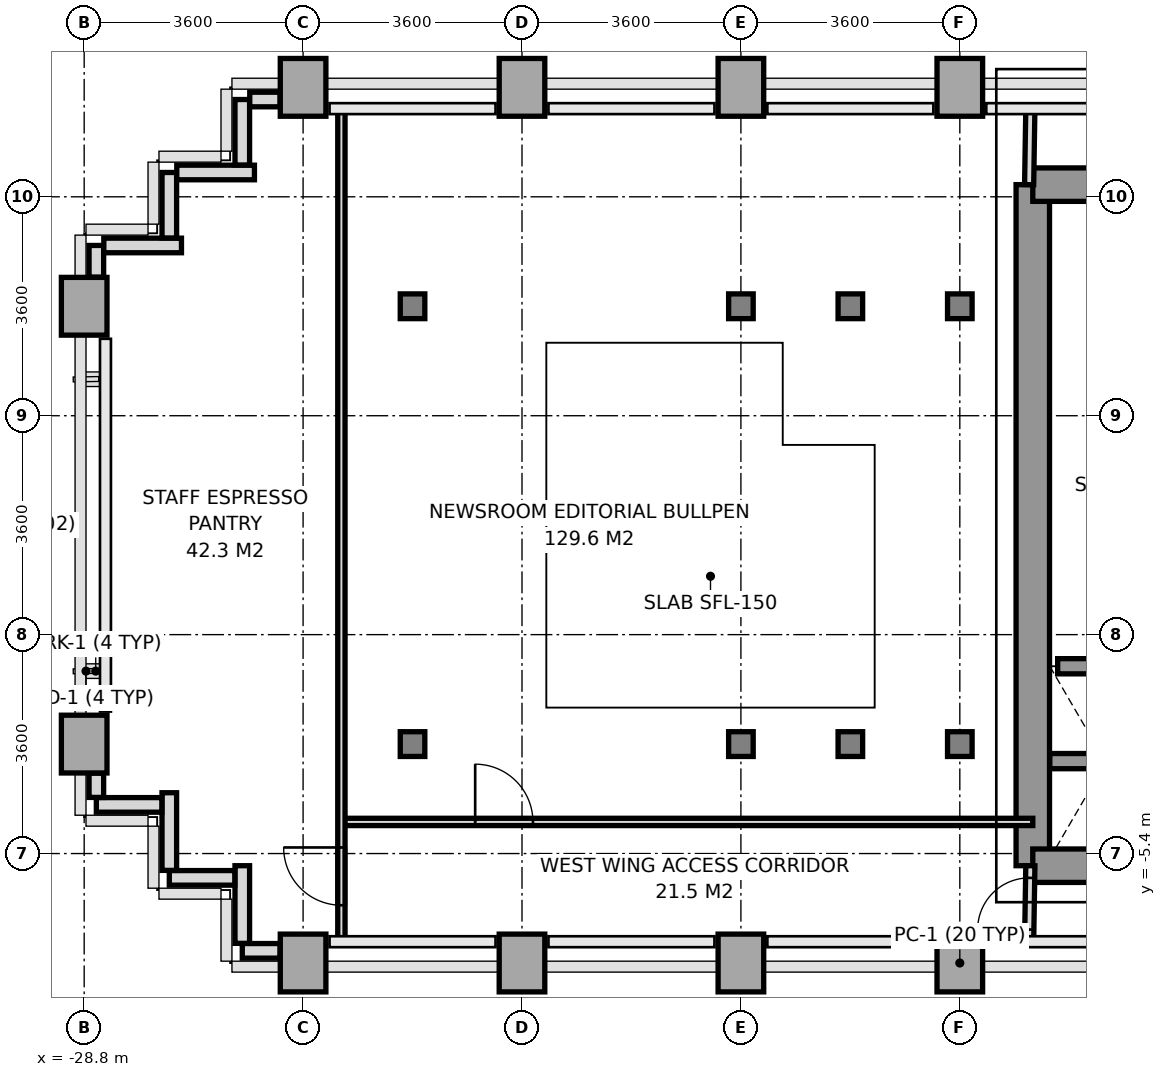
"""IFC4 building model, lengths in metres.
Left out: names, types, materials, properties, quantities, classifications, styles, units other than length and angle.
Written with IfcOpenShell. Run it as: python <this file> out.ifc"""

import sys

from ifc_helpers import new_model, si_unit, direction, frame, frame_2d, origin, origin_2d, place, context, subcontext, project, spatial, rectangle, i_section, extrude, source, transform, mapped, element, fill, save


model = new_model("IFC4")
c1 = context("Model", 3, precision=1e-05, world=origin(), true_north=direction((0.0, 1.0)))
c2 = subcontext(c1, "Body", "Model", "MODEL_VIEW")
j1 = project(units=[si_unit("LENGTHUNIT", "METRE"), si_unit("PLANEANGLEUNIT", "RADIAN")], contexts=[c1])
p1 = place(None, origin())
s1 = spatial("IfcSite", under=j1, at=p1, CompositionType="ELEMENT")
p2 = place(p1, origin())
s2 = spatial("IfcBuilding", under=s1, at=p2, CompositionType="ELEMENT")
p3 = place(p2, frame((0.0, 0.0, 30.6)))
s3 = spatial("IfcBuildingStorey", under=s2, at=p3, CompositionType="ELEMENT", Elevation=30.6)
m1 = source(origin(), c2, "Body", "SweptSolid", [
    extrude(rectangle(XDim=0.75, YDim=0.95, at=origin_2d()), origin(), (0.0, 0.0, 1.0), 3.2),
])
for number, where, z_axis, x_axis in (
    (1, (-28.8, -3.6, 0.0), (0.0, 0.0, 1.0), (1.0, 0.0, 0.0)),
    (2, (-28.8, 3.6, 0.0), (0.0, 0.0, 1.0), (1.0, 0.0, 0.0)),
    (3, (-25.2, -7.2, 0.0), (0.0, 0.0, 1.0), (1.0, 0.0, 0.0)),
    (4, (-25.2, 7.2, 0.0), (0.0, 0.0, 1.0), (1.0, 0.0, 0.0)),
):
    element("IfcColumn", number, at=place(p3, frame(where, z_axis=z_axis, x_axis=x_axis)), inside=s3, PredefinedType="COLUMN", context=c2, shape_type="MappedRepresentation", body=[
        mapped(m1, transform((0.0, 0.0, 0.0), x_axis=(1.0, 0.0, 0.0), y_axis=(0.0, 1.0, 0.0), z_axis=(0.0, 0.0, 1.0), scale=1.0)),
    ])
m2 = source(origin(), c2, "Body", "SweptSolid", [
    extrude(i_section(OverallWidth=0.404, OverallDepth=0.407, WebThickness=0.022, FlangeThickness=0.035, at=origin_2d()), origin(), (0.0, 0.0, 1.0), 3.2),
])
for number, where, z_axis, x_axis in (
    (5, (-23.4, -3.6, 0.0), (0.0, 0.0, 1.0), (1.0, 0.0, 0.0)),
    (6, (-23.4, 3.6, 0.0), (0.0, 0.0, 1.0), (1.0, 0.0, 0.0)),
):
    element("IfcColumn", number, at=place(p3, frame(where, z_axis=z_axis, x_axis=x_axis)), inside=s3, PredefinedType="COLUMN", context=c2, shape_type="MappedRepresentation", body=[
        mapped(m2, transform((0.0, 0.0, 0.0), x_axis=(1.0, 0.0, 0.0), y_axis=(0.0, 1.0, 0.0), z_axis=(0.0, 0.0, 1.0), scale=1.0)),
    ])
for number, where, z_axis, x_axis in (
    (7, (-21.6, -7.2, 0.0), (0.0, 0.0, 1.0), (1.0, 0.0, 0.0)),
    (8, (-21.6, 7.2, 0.0), (0.0, 0.0, 1.0), (1.0, 0.0, 0.0)),
    (9, (-18.0, -7.2, 0.0), (0.0, 0.0, 1.0), (1.0, 0.0, 0.0)),
):
    element("IfcColumn", number, at=place(p3, frame(where, z_axis=z_axis, x_axis=x_axis)), inside=s3, PredefinedType="COLUMN", context=c2, shape_type="MappedRepresentation", body=[
        mapped(m1, transform((0.0, 0.0, 0.0), x_axis=(1.0, 0.0, 0.0), y_axis=(0.0, 1.0, 0.0), z_axis=(0.0, 0.0, 1.0), scale=1.0)),
    ])
for number, where, z_axis, x_axis in (
    (10, (-18.0, -3.6, 0.0), (0.0, 0.0, 1.0), (1.0, 0.0, 0.0)),
    (11, (-18.0, 3.6, 0.0), (0.0, 0.0, 1.0), (1.0, 0.0, 0.0)),
):
    element("IfcColumn", number, at=place(p3, frame(where, z_axis=z_axis, x_axis=x_axis)), inside=s3, PredefinedType="COLUMN", context=c2, shape_type="MappedRepresentation", body=[
        mapped(m2, transform((0.0, 0.0, 0.0), x_axis=(1.0, 0.0, 0.0), y_axis=(0.0, 1.0, 0.0), z_axis=(0.0, 0.0, 1.0), scale=1.0)),
    ])
p4 = place(p3, frame((-18.0, 7.2, 0.0), z_axis=(0.0, 0.0, 1.0), x_axis=(1.0, 0.0, 0.0)))
e12 = element("IfcColumn", 12, at=p4, inside=s3, PredefinedType="COLUMN", context=c2, shape_type="MappedRepresentation", body=[
    mapped(m1, transform((0.0, 0.0, 0.0), x_axis=(1.0, 0.0, 0.0), y_axis=(0.0, 1.0, 0.0), z_axis=(0.0, 0.0, 1.0), scale=1.0)),
])
for number, where, z_axis, x_axis in (
    (13, (-16.2, -3.6, 0.0), (0.0, 0.0, 1.0), (1.0, 0.0, 0.0)),
    (14, (-16.2, 3.6, 0.0), (0.0, 0.0, 1.0), (1.0, 0.0, 0.0)),
):
    element("IfcColumn", number, at=place(p3, frame(where, z_axis=z_axis, x_axis=x_axis)), inside=s3, PredefinedType="COLUMN", context=c2, shape_type="MappedRepresentation", body=[
        mapped(m2, transform((0.0, 0.0, 0.0), x_axis=(1.0, 0.0, 0.0), y_axis=(0.0, 1.0, 0.0), z_axis=(0.0, 0.0, 1.0), scale=1.0)),
    ])
p5 = place(p3, frame((-14.4, -7.2, 0.0), z_axis=(0.0, 0.0, 1.0), x_axis=(1.0, 0.0, 0.0)))
e15 = element("IfcColumn", 15, at=p5, inside=s3, PredefinedType="COLUMN", context=c2, shape_type="MappedRepresentation", body=[
    mapped(m1, transform((0.0, 0.0, 0.0), x_axis=(1.0, 0.0, 0.0), y_axis=(0.0, 1.0, 0.0), z_axis=(0.0, 0.0, 1.0), scale=1.0)),
])
for number, where, z_axis, x_axis in (
    (16, (-14.4, -3.6, 0.0), (0.0, 0.0, 1.0), (1.0, 0.0, 0.0)),
    (17, (-14.4, 3.6, 0.0), (0.0, 0.0, 1.0), (1.0, 0.0, 0.0)),
):
    element("IfcColumn", number, at=place(p3, frame(where, z_axis=z_axis, x_axis=x_axis)), inside=s3, PredefinedType="COLUMN", context=c2, shape_type="MappedRepresentation", body=[
        mapped(m2, transform((0.0, 0.0, 0.0), x_axis=(1.0, 0.0, 0.0), y_axis=(0.0, 1.0, 0.0), z_axis=(0.0, 0.0, 1.0), scale=1.0)),
    ])
p6 = place(p3, frame((-14.4, 7.2, 0.0), z_axis=(0.0, 0.0, 1.0), x_axis=(1.0, 0.0, 0.0)))
e18 = element("IfcColumn", 18, at=p6, inside=s3, PredefinedType="COLUMN", context=c2, shape_type="MappedRepresentation", body=[
    mapped(m1, transform((0.0, 0.0, 0.0), x_axis=(1.0, 0.0, 0.0), y_axis=(0.0, 1.0, 0.0), z_axis=(0.0, 0.0, 1.0), scale=1.0)),
])
p7 = place(p3, frame((-25.578, -7.0, 0.0), z_axis=(0.0, 0.0, 1.0), x_axis=(-1.0, 0.0, 0.0)))
e19 = element("IfcWall", 19, at=p7, inside=s3, PredefinedType="PARAPET", context=c2, shape_type="SweptSolid", body=[
    extrude(rectangle(XDim=0.622, YDim=0.24, at=frame_2d((0.311, 0.0))), origin(), (0.0, 0.0, 1.0), 1.15),
])
p8 = place(p3, frame((-26.2, -6.877, 0.0), z_axis=(0.0, 0.0, 1.0), x_axis=(0.0, 1.0, 0.0)))
e20 = element("IfcWall", 20, at=p8, inside=s3, PredefinedType="PARAPET", context=c2, shape_type="SweptSolid", body=[
    extrude(rectangle(XDim=1.277, YDim=0.24, at=frame_2d((0.638, 0.0))), origin(), (0.0, 0.0, 1.0), 1.15),
])
p9 = place(p3, frame((-26.323, -5.8, 0.0), z_axis=(0.0, 0.0, 1.0), x_axis=(-1.0, 0.0, 0.0)))
e21 = element("IfcWall", 21, at=p9, inside=s3, PredefinedType="PARAPET", context=c2, shape_type="SweptSolid", body=[
    extrude(rectangle(XDim=1.077, YDim=0.24, at=frame_2d((0.539, 0.0))), origin(), (0.0, 0.0, 1.0), 1.15),
])
p10 = place(p3, frame((-27.4, -5.677, 0.0), z_axis=(0.0, 0.0, 1.0), x_axis=(0.0, 1.0, 0.0)))
e22 = element("IfcWall", 22, at=p10, inside=s3, PredefinedType="PARAPET", context=c2, shape_type="SweptSolid", body=[
    extrude(rectangle(XDim=1.277, YDim=0.24, at=frame_2d((0.639, 0.0))), origin(), (0.0, 0.0, 1.0), 1.15),
])
p11 = place(p3, frame((-27.523, -4.6, 0.0), z_axis=(0.0, 0.0, 1.0), x_axis=(-1.0, 0.0, 0.0)))
e23 = element("IfcWall", 23, at=p11, inside=s3, PredefinedType="PARAPET", context=c2, shape_type="SweptSolid", body=[
    extrude(rectangle(XDim=1.077, YDim=0.24, at=frame_2d((0.539, 0.0))), origin(), (0.0, 0.0, 1.0), 1.15),
])
p12 = place(p3, frame((-28.6, -4.477, 0.0), z_axis=(0.0, 0.0, 1.0), x_axis=(0.0, 1.0, 0.0)))
e24 = element("IfcWall", 24, at=p12, inside=s3, PredefinedType="PARAPET", context=c2, shape_type="SweptSolid", body=[
    extrude(rectangle(XDim=0.399, YDim=0.24, at=frame_2d((0.2, 0.0))), origin(), (0.0, 0.0, 1.0), 1.15),
])
p13 = place(p3, frame((-28.6, 4.078, 0.0), z_axis=(0.0, 0.0, 1.0), x_axis=(0.0, 1.0, 0.0)))
e25 = element("IfcWall", 25, at=p13, inside=s3, PredefinedType="PARAPET", context=c2, shape_type="SweptSolid", body=[
    extrude(rectangle(XDim=0.522, YDim=0.24, at=frame_2d((0.261, 0.0))), origin(), (0.0, 0.0, 1.0), 1.15),
])
p14 = place(p3, frame((-28.477, 4.6, 0.0), z_axis=(0.0, 0.0, 1.0), x_axis=(1.0, 0.0, 0.0)))
e26 = element("IfcWall", 26, at=p14, inside=s3, PredefinedType="PARAPET", context=c2, shape_type="SweptSolid", body=[
    extrude(rectangle(XDim=1.277, YDim=0.24, at=frame_2d((0.639, 0.0))), origin(), (0.0, 0.0, 1.0), 1.15),
])
p15 = place(p3, frame((-27.4, 4.723, 0.0), z_axis=(0.0, 0.0, 1.0), x_axis=(0.0, 1.0, 0.0)))
e27 = element("IfcWall", 27, at=p15, inside=s3, PredefinedType="PARAPET", context=c2, shape_type="SweptSolid", body=[
    extrude(rectangle(XDim=1.077, YDim=0.24, at=frame_2d((0.539, 0.0))), origin(), (0.0, 0.0, 1.0), 1.15),
])
p16 = place(p3, frame((-27.277, 5.8, 0.0), z_axis=(0.0, 0.0, 1.0), x_axis=(1.0, 0.0, 0.0)))
e28 = element("IfcWall", 28, at=p16, inside=s3, PredefinedType="PARAPET", context=c2, shape_type="SweptSolid", body=[
    extrude(rectangle(XDim=1.277, YDim=0.24, at=frame_2d((0.639, 0.0))), origin(), (0.0, 0.0, 1.0), 1.15),
])
p17 = place(p3, frame((-26.2, 5.923, 0.0), z_axis=(0.0, 0.0, 1.0), x_axis=(0.0, 1.0, 0.0)))
e29 = element("IfcWall", 29, at=p17, inside=s3, PredefinedType="PARAPET", context=c2, shape_type="SweptSolid", body=[
    extrude(rectangle(XDim=1.077, YDim=0.24, at=frame_2d((0.539, 0.0))), origin(), (0.0, 0.0, 1.0), 1.15),
])
p18 = place(p3, frame((-26.077, 7.0, 0.0), z_axis=(0.0, 0.0, 1.0), x_axis=(1.0, 0.0, 0.0)))
e30 = element("IfcWall", 30, at=p18, inside=s3, PredefinedType="PARAPET", context=c2, shape_type="SweptSolid", body=[
    extrude(rectangle(XDim=0.499, YDim=0.24, at=frame_2d((0.25, 0.0))), origin(), (0.0, 0.0, 1.0), 1.15),
])
p19 = place(p3, frame((-13.2, -5.6, 0.0), z_axis=(0.0, 0.0, 1.0), x_axis=(0.0, 1.0, 0.0)))
e31 = element("IfcWall", 31, at=p19, inside=s3, PredefinedType="SHEAR", context=c2, shape_type="SweptSolid", body=[
    extrude(rectangle(XDim=11.2, YDim=0.55, at=frame_2d((5.6, 0.0))), origin(), (0.0, 0.0, 1.0), 3.2),
])
p20 = place(p3, frame((-13.2, 5.6, 0.0), z_axis=(0.0, 0.0, 1.0), x_axis=(1.0, 0.0, 0.0)))
e32 = element("IfcWall", 32, at=p20, inside=s3, PredefinedType="SHEAR", context=c2, shape_type="SweptSolid", body=[
    extrude(rectangle(XDim=1.819, YDim=0.55, at=frame_2d((0.909, 0.0))), origin(), (0.0, 0.0, 1.0), 3.2),
])
p21 = place(p3, frame((-13.2, -5.6, 0.0), z_axis=(0.0, 0.0, 1.0), x_axis=(1.0, 0.0, 0.0)))
e33 = element("IfcWall", 33, at=p21, inside=s3, PredefinedType="SHEAR", context=c2, shape_type="SweptSolid", body=[
    extrude(rectangle(XDim=7.8, YDim=0.55, at=frame_2d((3.9, 0.0))), origin(), (0.0, 0.0, 1.0), 3.2),
])
p22 = place(p21, frame((3.6, 0.0, 0.0)))
e34 = element("IfcOpeningElement", 34, at=p22, cuts=e33, PredefinedType="OPENING", context=c2, shape_type="SweptSolid", body=[
    extrude(rectangle(XDim=1.2, YDim=2.2, at=frame_2d((0.6, 1.1))), frame((0.0, 0.285, 0.0), z_axis=(0.0, -1.0, 0.0), x_axis=(1.0, 0.0, 0.0)), (0.0, 0.0, 1.0), 0.57),
])
p23 = place(p3, frame((-12.92, -3.88, 0.0), z_axis=(0.0, 0.0, 1.0), x_axis=(1.0, 0.0, 0.0)))
e35 = element("IfcWall", 35, at=p23, inside=s3, PredefinedType="SOLIDWALL", context=c2, shape_type="SweptSolid", body=[
    extrude(rectangle(XDim=1.84, YDim=0.25, at=frame_2d((0.92, 0.0))), origin(), (0.0, 0.0, 1.0), 3.2),
])
p24 = place(p3, frame((-12.791, -2.32, 0.0), z_axis=(0.0, 0.0, 1.0), x_axis=(1.0, 0.0, 0.0)))
e36 = element("IfcWall", 36, at=p24, inside=s3, PredefinedType="SOLIDWALL", context=c2, shape_type="SweptSolid", body=[
    extrude(rectangle(XDim=1.582, YDim=0.25, at=frame_2d((0.791, 0.0))), origin(), (0.0, 0.0, 1.0), 3.2),
])
p25 = place(p3, frame((-13.26, 5.6, 0.0), z_axis=(0.0, 0.0, 1.0), x_axis=(0.016013571389, 0.999871774545, 0.0)))
e37 = element("IfcWall", 37, at=p25, inside=s3, PredefinedType="PARTITIONING", context=c2, shape_type="SweptSolid", body=[
    extrude(rectangle(XDim=1.25, YDim=0.15, at=frame_2d((0.625, 0.0))), origin(), (0.0, 0.0, 1.0), 3.2),
])
p26 = place(p3, frame((-13.26, -6.85, 0.0), z_axis=(0.0, 0.0, 1.0), x_axis=(0.016013571389, 0.999871774545, 0.0)))
e38 = element("IfcWall", 38, at=p26, inside=s3, PredefinedType="PARTITIONING", context=c2, shape_type="SweptSolid", body=[
    extrude(rectangle(XDim=1.25, YDim=0.15, at=frame_2d((0.625, 0.0))), origin(), (0.0, 0.0, 1.0), 3.2),
])
p27 = place(p26, frame((0.2, 0.0, 0.0)))
e39 = element("IfcOpeningElement", 39, at=p27, cuts=e38, PredefinedType="OPENING", context=c2, shape_type="SweptSolid", body=[
    extrude(rectangle(XDim=0.85, YDim=2.1, at=frame_2d((0.425, 1.05))), frame((0.0, 0.085, 0.0), z_axis=(0.0, -1.0, 0.0), x_axis=(1.0, 0.0, 0.0)), (0.0, 0.0, 1.0), 0.17),
])
p28 = place(p3, frame((-24.57, -4.88, 0.0), z_axis=(0.0, 0.0, 1.0), x_axis=(1.0, 0.0, 0.0)))
e40 = element("IfcWall", 40, at=p28, inside=s3, PredefinedType="PARTITIONING", context=c2, shape_type="SweptSolid", body=[
    extrude(rectangle(XDim=11.37, YDim=0.12, at=frame_2d((5.685, 0.0))), origin(), (0.0, 0.0, 1.0), 2.7),
])
p29 = place(p28, frame((2.2, 0.0, 0.0)))
e41 = element("IfcOpeningElement", 41, at=p29, cuts=e40, PredefinedType="OPENING", context=c2, shape_type="SweptSolid", body=[
    extrude(rectangle(XDim=0.95, YDim=2.15, at=frame_2d((0.475, 1.075))), frame((0.0, 0.07, 0.0), z_axis=(0.0, -1.0, 0.0), x_axis=(1.0, 0.0, 0.0)), (0.0, 0.0, 1.0), 0.14),
])
p30 = place(p3, frame((-24.57, -6.85, 0.0), z_axis=(0.0, 0.0, 1.0), x_axis=(0.0, 1.0, 0.0)))
e42 = element("IfcWall", 42, at=p30, inside=s3, PredefinedType="PARTITIONING", context=c2, shape_type="SweptSolid", body=[
    extrude(rectangle(XDim=13.7, YDim=0.12, at=frame_2d((6.85, 0.0))), origin(), (0.0, 0.0, 1.0), 2.65),
])
p31 = place(p30, frame((0.6, 0.0, 0.0)))
e43 = element("IfcOpeningElement", 43, at=p31, cuts=e42, PredefinedType="OPENING", context=c2, shape_type="SweptSolid", body=[
    extrude(rectangle(XDim=0.95, YDim=2.15, at=frame_2d((0.475, 1.075))), frame((0.0, 0.07, 0.0), z_axis=(0.0, -1.0, 0.0), x_axis=(1.0, 0.0, 0.0)), (0.0, 0.0, 1.0), 0.14),
])
m3 = source(origin(), c2, "Body", "SweptSolid", [
    extrude(rectangle(XDim=0.95, YDim=2.15, at=frame_2d((0.475, 1.075))), frame((0.0, 0.025, 0.0), z_axis=(0.0, -1.0, 0.0), x_axis=(1.0, 0.0, 0.0)), (0.0, 0.0, 1.0), 0.05),
])
p32 = place(p29, origin())
e44 = element("IfcDoor", 44, at=p32, inside=s3, OperationType="SINGLE_SWING_LEFT", PredefinedType="DOOR", context=c2, shape_type="MappedRepresentation", body=[
    mapped(m3, transform((0.0, 0.0, 0.0), x_axis=(1.0, 0.0, 0.0), y_axis=(0.0, 1.0, 0.0), z_axis=(0.0, 0.0, 1.0), scale=1.0)),
])
fill(e41, e44)
p33 = place(p31, origin())
e45 = element("IfcDoor", 45, at=p33, inside=s3, OperationType="SINGLE_SWING_RIGHT", PredefinedType="DOOR", context=c2, shape_type="MappedRepresentation", body=[
    mapped(m3, transform((0.0, 0.0, 0.0), x_axis=(1.0, 0.0, 0.0), y_axis=(0.0, 1.0, 0.0), z_axis=(0.0, 0.0, 1.0), scale=1.0)),
])
fill(e43, e45)
m4 = source(origin(), c2, "Body", "SweptSolid", [
    extrude(rectangle(XDim=0.85, YDim=2.1, at=frame_2d((0.425, 1.05))), frame((0.0, 0.025, 0.0), z_axis=(0.0, -1.0, 0.0), x_axis=(1.0, 0.0, 0.0)), (0.0, 0.0, 1.0), 0.05),
])
p34 = place(p27, origin())
e46 = element("IfcDoor", 46, at=p34, inside=s3, OperationType="SINGLE_SWING_LEFT", PredefinedType="DOOR", context=c2, shape_type="MappedRepresentation", body=[
    mapped(m4, transform((0.0, 0.0, 0.0), x_axis=(1.0, 0.0, 0.0), y_axis=(0.0, 1.0, 0.0), z_axis=(0.0, 0.0, 1.0), scale=1.0)),
])
fill(e39, e46)
save(model, sys.argv[1])
